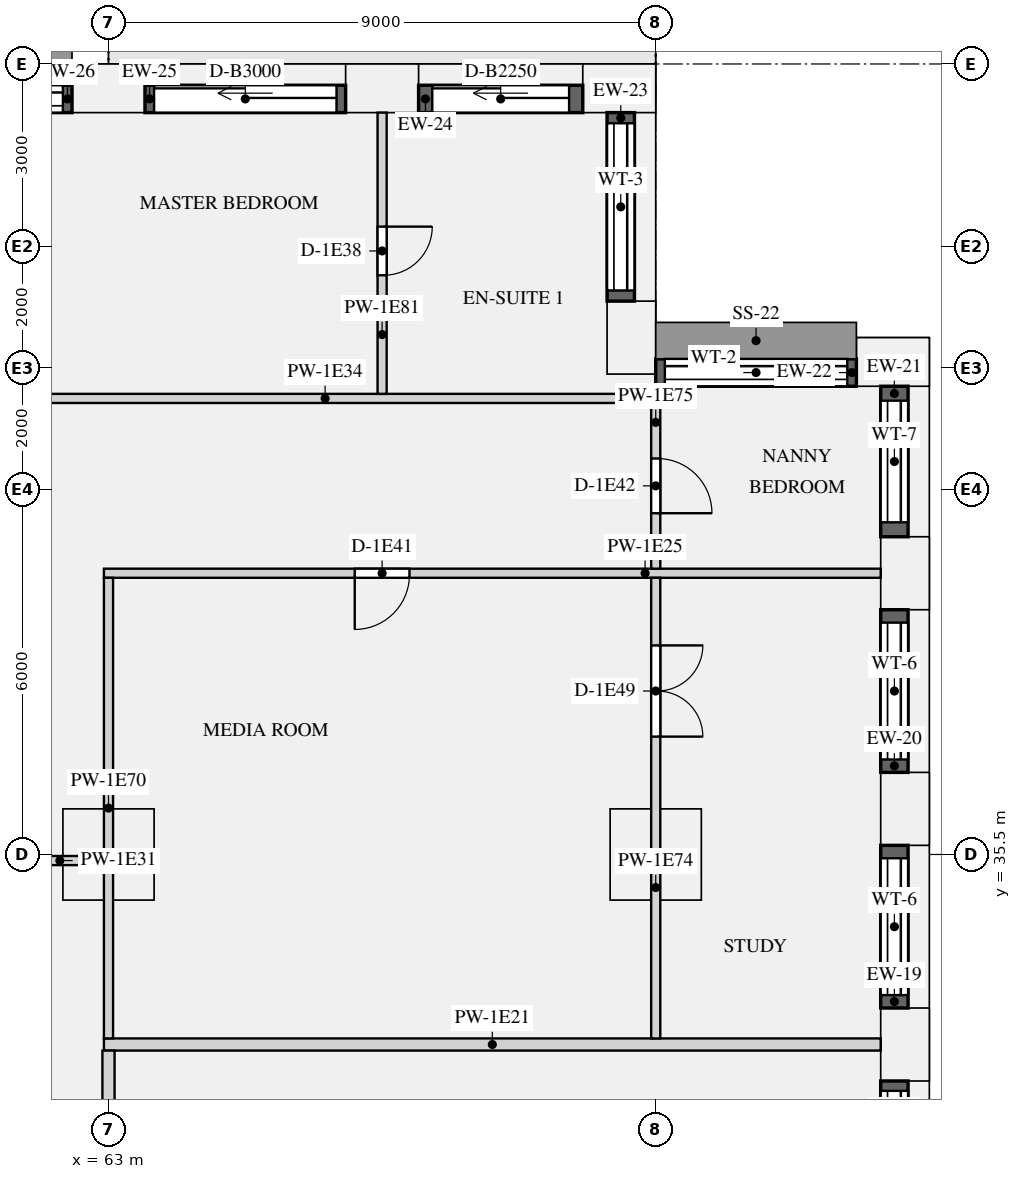
"""IFC4 building model, lengths in metres.
Left out: names, types, materials, properties, quantities, classifications, styles, units other than length and angle.
Written with IfcOpenShell. Run it as: python <this file> out.ifc"""

import sys

from ifc_helpers import new_model, si_unit, direction, frame, frame_2d, origin, origin_2d, place, context, subcontext, project, spatial, rectangle, extrude, element, fill, save


model = new_model("IFC4")
c1 = context("Model", 3, precision=1e-05, world=origin(), true_north=direction((0.0, 1.0)))
c2 = subcontext(c1, "Body", "Model", "MODEL_VIEW")
j1 = project(units=[si_unit("LENGTHUNIT", "METRE"), si_unit("PLANEANGLEUNIT", "RADIAN")], contexts=[c1])
p1 = place(None, origin())
s1 = spatial("IfcSite", under=j1, at=p1, CompositionType="ELEMENT")
p2 = place(p1, origin())
s2 = spatial("IfcBuilding", under=s1, at=p2, CompositionType="ELEMENT")
p3 = place(p2, frame((0.0, 0.0, 54.15)))
s3 = spatial("IfcBuildingStorey", under=s2, at=p3, CompositionType="ELEMENT", Elevation=54.15)
for number, where, z_axis, x_axis in (
    (1, (76.1, 32.375, 0.0), (0.0, 0.0, 1.0), (0.0, 1.0, 0.0)),
    (2, (76.1, 36.25, 0.0), (0.0, 0.0, 1.0), (0.0, 1.0, 0.0)),
    (3, (76.1, 40.125, 0.0), (0.0, 0.0, 1.0), (0.0, 1.0, 0.0)),
    (4, (75.9, 43.6, 0.0), (0.0, 0.0, 1.0), (-1.0, 0.0, 0.0)),
    (5, (71.6, 44.0, 0.0), (0.0, 0.0, 1.0), (0.0, 1.0, 0.0)),
    (6, (71.4, 48.1, 0.0), (0.0, 0.0, 1.0), (-1.0, 0.0, 0.0)),
    (7, (67.5, 48.1, 0.0), (0.0, 0.0, 1.0), (-1.0, 0.0, 0.0)),
    (8, (63.0, 48.1, 0.0), (0.0, 0.0, 1.0), (-1.0, 0.0, 0.0)),
):
    element("IfcColumn", number, at=place(p3, frame(where, z_axis=z_axis, x_axis=x_axis)), inside=s3, PredefinedType="USERDEFINED", context=c2, shape_type="SweptSolid", body=[
        extrude(rectangle(XDim=1.2, YDim=0.8, at=origin_2d()), origin(), (0.0, 0.0, 1.0), 3.15),
    ])
for number, where, z_axis, x_axis in (
    (9, (63.0, 35.5, 0.0), (0.0, 0.0, 1.0), (1.0, 0.0, 0.0)),
    (10, (72.0, 35.5, 0.0), (0.0, 0.0, 1.0), (1.0, 0.0, 0.0)),
):
    element("IfcColumn", number, at=place(p3, frame(where, z_axis=z_axis, x_axis=x_axis)), inside=s3, PredefinedType="COLUMN", context=c2, shape_type="SweptSolid", body=[
        extrude(rectangle(XDim=1.5, YDim=1.5, at=origin_2d()), origin(), (0.0, 0.0, 1.0), 3.15),
    ])
p4 = place(p3, frame((75.925, 29.7, 0.9), z_axis=(0.0, 0.0, 1.0), x_axis=(0.0, 1.0, 0.0)))
e11 = element("IfcWall", 11, at=p4, inside=s3, PredefinedType="SOLIDWALL", context=c2, shape_type="SweptSolid", body=[
    extrude(rectangle(XDim=2.075, YDim=0.45, at=frame_2d((1.038, 0.0))), origin(), (0.0, 0.0, 1.0), 1.93),
])
p5 = place(p4, frame((0.163, 0.0, 0.15)))
e12 = element("IfcOpeningElement", 12, at=p5, cuts=e11, PredefinedType="OPENING", context=c2, shape_type="SweptSolid", body=[
    extrude(rectangle(XDim=1.75, YDim=1.5, at=frame_2d((0.875, 0.75))), frame((0.0, 0.235, 0.0), z_axis=(0.0, -1.0, 0.0), x_axis=(1.0, 0.0, 0.0)), (0.0, 0.0, 1.0), 0.47),
])
p6 = place(p3, frame((75.925, 32.975, 0.9), z_axis=(0.0, 0.0, 1.0), x_axis=(0.0, 1.0, 0.0)))
e13 = element("IfcWall", 13, at=p6, inside=s3, PredefinedType="SOLIDWALL", context=c2, shape_type="SweptSolid", body=[
    extrude(rectangle(XDim=2.675, YDim=0.45, at=frame_2d((1.337, 0.0))), origin(), (0.0, 0.0, 1.0), 1.93),
])
p7 = place(p6, frame((0.212, 0.0, 0.15)))
e14 = element("IfcOpeningElement", 14, at=p7, cuts=e13, PredefinedType="OPENING", context=c2, shape_type="SweptSolid", body=[
    extrude(rectangle(XDim=2.25, YDim=1.5, at=frame_2d((1.125, 0.75))), frame((0.0, 0.235, 0.0), z_axis=(0.0, -1.0, 0.0), x_axis=(1.0, 0.0, 0.0)), (0.0, 0.0, 1.0), 0.47),
])
p8 = place(p3, frame((75.925, 36.85, 0.9), z_axis=(0.0, 0.0, 1.0), x_axis=(0.0, 1.0, 0.0)))
e15 = element("IfcWall", 15, at=p8, inside=s3, PredefinedType="SOLIDWALL", context=c2, shape_type="SweptSolid", body=[
    extrude(rectangle(XDim=2.675, YDim=0.45, at=frame_2d((1.337, 0.0))), origin(), (0.0, 0.0, 1.0), 1.93),
])
p9 = place(p8, frame((0.212, 0.0, 0.15)))
e16 = element("IfcOpeningElement", 16, at=p9, cuts=e15, PredefinedType="OPENING", context=c2, shape_type="SweptSolid", body=[
    extrude(rectangle(XDim=2.25, YDim=1.5, at=frame_2d((1.125, 0.75))), frame((0.0, 0.235, 0.0), z_axis=(0.0, -1.0, 0.0), x_axis=(1.0, 0.0, 0.0)), (0.0, 0.0, 1.0), 0.47),
])
p10 = place(p3, frame((75.925, 40.725, 0.9), z_axis=(0.0, 0.0, 1.0), x_axis=(0.0, 1.0, 0.0)))
e17 = element("IfcWall", 17, at=p10, inside=s3, PredefinedType="SOLIDWALL", context=c2, shape_type="SweptSolid", body=[
    extrude(rectangle(XDim=2.475, YDim=0.45, at=frame_2d((1.237, 0.0))), origin(), (0.0, 0.0, 1.0), 1.93),
])
p11 = place(p10, frame((0.238, 0.0, 0.15)))
e18 = element("IfcOpeningElement", 18, at=p11, cuts=e17, PredefinedType="OPENING", context=c2, shape_type="SweptSolid", body=[
    extrude(rectangle(XDim=2.0, YDim=1.5, at=frame_2d((1.0, 0.75))), frame((0.0, 0.235, 0.0), z_axis=(0.0, -1.0, 0.0), x_axis=(1.0, 0.0, 0.0)), (0.0, 0.0, 1.0), 0.47),
])
p12 = place(p3, frame((75.3, 43.425, 0.9), z_axis=(0.0, 0.0, 1.0), x_axis=(-1.0, 0.0, 0.0)))
e19 = element("IfcWall", 19, at=p12, inside=s3, PredefinedType="SOLIDWALL", context=c2, shape_type="SweptSolid", body=[
    extrude(rectangle(XDim=3.3, YDim=0.45, at=frame_2d((1.65, 0.0))), origin(), (0.0, 0.0, 1.0), 1.93),
])
p13 = place(p12, frame((0.15, 0.0, 0.15)))
e20 = element("IfcOpeningElement", 20, at=p13, cuts=e19, PredefinedType="OPENING", context=c2, shape_type="SweptSolid", body=[
    extrude(rectangle(XDim=3.0, YDim=1.5, at=frame_2d((1.5, 0.75))), frame((0.0, 0.235, 0.0), z_axis=(0.0, -1.0, 0.0), x_axis=(1.0, 0.0, 0.0)), (0.0, 0.0, 1.0), 0.47),
])
p14 = place(p3, frame((71.425, 44.6, 0.9), z_axis=(0.0, 0.0, 1.0), x_axis=(0.0, 1.0, 0.0)))
e21 = element("IfcWall", 21, at=p14, inside=s3, PredefinedType="SOLIDWALL", context=c2, shape_type="SweptSolid", body=[
    extrude(rectangle(XDim=3.1, YDim=0.45, at=frame_2d((1.55, 0.0))), origin(), (0.0, 0.0, 1.0), 1.93),
])
p15 = place(p14, frame((0.175, 0.0, 0.15)))
e22 = element("IfcOpeningElement", 22, at=p15, cuts=e21, PredefinedType="OPENING", context=c2, shape_type="SweptSolid", body=[
    extrude(rectangle(XDim=2.75, YDim=1.5, at=frame_2d((1.375, 0.75))), frame((0.0, 0.235, 0.0), z_axis=(0.0, -1.0, 0.0), x_axis=(1.0, 0.0, 0.0)), (0.0, 0.0, 1.0), 0.47),
])
p16 = place(p3, frame((70.8, 47.925, 0.0), z_axis=(0.0, 0.0, 1.0), x_axis=(-1.0, 0.0, 0.0)))
e23 = element("IfcWall", 23, at=p16, inside=s3, PredefinedType="SOLIDWALL", context=c2, shape_type="SweptSolid", body=[
    extrude(rectangle(XDim=2.7, YDim=0.45, at=frame_2d((1.35, 0.0))), origin(), (0.0, 0.0, 1.0), 2.83),
])
p17 = place(p16, frame((0.225, 0.0, 0.0)))
e24 = element("IfcOpeningElement", 24, at=p17, cuts=e23, PredefinedType="OPENING", context=c2, shape_type="SweptSolid", body=[
    extrude(rectangle(XDim=2.25, YDim=2.3, at=frame_2d((1.125, 1.15))), frame((0.0, 0.235, 0.0), z_axis=(0.0, -1.0, 0.0), x_axis=(1.0, 0.0, 0.0)), (0.0, 0.0, 1.0), 0.47),
])
p18 = place(p3, frame((66.9, 47.925, 0.0), z_axis=(0.0, 0.0, 1.0), x_axis=(-1.0, 0.0, 0.0)))
e25 = element("IfcWall", 25, at=p18, inside=s3, PredefinedType="SOLIDWALL", context=c2, shape_type="SweptSolid", body=[
    extrude(rectangle(XDim=3.3, YDim=0.45, at=frame_2d((1.65, 0.0))), origin(), (0.0, 0.0, 1.0), 2.83),
])
p19 = place(p18, frame((0.15, 0.0, 0.0)))
e26 = element("IfcOpeningElement", 26, at=p19, cuts=e25, PredefinedType="OPENING", context=c2, shape_type="SweptSolid", body=[
    extrude(rectangle(XDim=3.0, YDim=2.3, at=frame_2d((1.5, 1.15))), frame((0.0, 0.235, 0.0), z_axis=(0.0, -1.0, 0.0), x_axis=(1.0, 0.0, 0.0)), (0.0, 0.0, 1.0), 0.47),
])
p20 = place(p3, frame((62.4, 47.925, 0.9), z_axis=(0.0, 0.0, 1.0), x_axis=(-1.0, 0.0, 0.0)))
e27 = element("IfcWall", 27, at=p20, inside=s3, PredefinedType="SOLIDWALL", context=c2, shape_type="SweptSolid", body=[
    extrude(rectangle(XDim=3.3, YDim=0.45, at=frame_2d((1.65, 0.0))), origin(), (0.0, 0.0, 1.0), 1.93),
])
p21 = place(p20, frame((0.15, 0.0, 0.15)))
e28 = element("IfcOpeningElement", 28, at=p21, cuts=e27, PredefinedType="OPENING", context=c2, shape_type="SweptSolid", body=[
    extrude(rectangle(XDim=3.0, YDim=1.5, at=frame_2d((1.5, 0.75))), frame((0.0, 0.235, 0.0), z_axis=(0.0, -1.0, 0.0), x_axis=(1.0, 0.0, 0.0)), (0.0, 0.0, 1.0), 0.47),
])
p22 = place(p3, frame((62.925, 32.375, 0.0), z_axis=(0.0, 0.0, 1.0), x_axis=(1.0, 0.0, 0.0)))
e29 = element("IfcWall", 29, at=p22, inside=s3, PredefinedType="PARTITIONING", context=c2, shape_type="SweptSolid", body=[
    extrude(rectangle(XDim=12.775, YDim=0.2, at=frame_2d((6.387, 0.0))), origin(), (0.0, 0.0, 1.0), 2.83),
])
p23 = place(p3, frame((62.925, 40.125, 0.0), z_axis=(0.0, 0.0, 1.0), x_axis=(1.0, 0.0, 0.0)))
e30 = element("IfcWall", 30, at=p23, inside=s3, PredefinedType="PARTITIONING", context=c2, shape_type="SweptSolid", body=[
    extrude(rectangle(XDim=12.775, YDim=0.15, at=frame_2d((6.387, 0.0))), origin(), (0.0, 0.0, 1.0), 2.83),
])
p24 = place(p23, frame((4.125, 0.0, 0.0)))
e31 = element("IfcOpeningElement", 31, at=p24, cuts=e30, PredefinedType="OPENING", context=c2, shape_type="SweptSolid", body=[
    extrude(rectangle(XDim=0.9, YDim=2.1, at=frame_2d((0.45, 1.05))), frame((0.0, 0.085, 0.0), z_axis=(0.0, -1.0, 0.0), x_axis=(1.0, 0.0, 0.0)), (0.0, 0.0, 1.0), 0.17),
])
p25 = place(p3, frame((59.8, 35.4, 0.0), z_axis=(0.0, 0.0, 1.0), x_axis=(1.0, 0.0, 0.0)))
e32 = element("IfcWall", 32, at=p25, inside=s3, PredefinedType="PARTITIONING", context=c2, shape_type="SweptSolid", body=[
    extrude(rectangle(XDim=3.125, YDim=0.15, at=frame_2d((1.562, 0.0))), origin(), (0.0, 0.0, 1.0), 2.83),
])
p26 = place(p25, frame((0.775, 0.0, 0.0)))
e33 = element("IfcOpeningElement", 33, at=p26, cuts=e32, PredefinedType="OPENING", context=c2, shape_type="SweptSolid", body=[
    extrude(rectangle(XDim=0.9, YDim=2.1, at=frame_2d((0.45, 1.05))), frame((0.0, 0.085, 0.0), z_axis=(0.0, -1.0, 0.0), x_axis=(1.0, 0.0, 0.0)), (0.0, 0.0, 1.0), 0.17),
])
p27 = place(p3, frame((54.075, 43.0, 0.0), z_axis=(0.0, 0.0, 1.0), x_axis=(1.0, 0.0, 0.0)))
e34 = element("IfcWall", 34, at=p27, inside=s3, PredefinedType="PARTITIONING", context=c2, shape_type="SweptSolid", body=[
    extrude(rectangle(XDim=17.85, YDim=0.15, at=frame_2d((8.925, 0.0))), origin(), (0.0, 0.0, 1.0), 2.83),
])
p28 = place(p27, frame((6.225, 0.0, 0.0)))
e35 = element("IfcOpeningElement", 35, at=p28, cuts=e34, PredefinedType="OPENING", context=c2, shape_type="SweptSolid", body=[
    extrude(rectangle(XDim=0.9, YDim=2.1, at=frame_2d((0.45, 1.05))), frame((0.0, 0.085, 0.0), z_axis=(0.0, -1.0, 0.0), x_axis=(1.0, 0.0, 0.0)), (0.0, 0.0, 1.0), 0.17),
])
p29 = place(p27, frame((1.725, 0.0, 0.0)))
e36 = element("IfcOpeningElement", 36, at=p29, cuts=e34, PredefinedType="OPENING", context=c2, shape_type="SweptSolid", body=[
    extrude(rectangle(XDim=0.9, YDim=2.1, at=frame_2d((0.45, 1.05))), frame((0.0, 0.085, 0.0), z_axis=(0.0, -1.0, 0.0), x_axis=(1.0, 0.0, 0.0)), (0.0, 0.0, 1.0), 0.17),
])
p30 = place(p3, frame((63.0, 32.475, 0.0), z_axis=(0.0, 0.0, 1.0), x_axis=(0.0, 1.0, 0.0)))
e37 = element("IfcWall", 37, at=p30, inside=s3, PredefinedType="PARTITIONING", context=c2, shape_type="SweptSolid", body=[
    extrude(rectangle(XDim=7.575, YDim=0.15, at=frame_2d((3.788, 0.0))), origin(), (0.0, 0.0, 1.0), 2.83),
])
p31 = place(p3, frame((63.0, 28.575, 0.0), z_axis=(0.0, 0.0, 1.0), x_axis=(0.0, 1.0, 0.0)))
e38 = element("IfcWall", 38, at=p31, inside=s3, PredefinedType="PARTITIONING", context=c2, shape_type="SweptSolid", body=[
    extrude(rectangle(XDim=3.7, YDim=0.2, at=frame_2d((1.85, 0.0))), origin(), (0.0, 0.0, 1.0), 2.83),
])
p32 = place(p3, frame((72.0, 32.475, 0.0), z_axis=(0.0, 0.0, 1.0), x_axis=(0.0, 1.0, 0.0)))
e39 = element("IfcWall", 39, at=p32, inside=s3, PredefinedType="PARTITIONING", context=c2, shape_type="SweptSolid", body=[
    extrude(rectangle(XDim=7.575, YDim=0.15, at=frame_2d((3.788, 0.0))), origin(), (0.0, 0.0, 1.0), 2.83),
])
p33 = place(p32, frame((4.963, 0.0, 0.0)))
e40 = element("IfcOpeningElement", 40, at=p33, cuts=e39, PredefinedType="OPENING", context=c2, shape_type="SweptSolid", body=[
    extrude(rectangle(XDim=1.5, YDim=2.1, at=frame_2d((0.75, 1.05))), frame((0.0, 0.085, 0.0), z_axis=(0.0, -1.0, 0.0), x_axis=(1.0, 0.0, 0.0)), (0.0, 0.0, 1.0), 0.17),
])
p34 = place(p3, frame((72.0, 40.2, 0.0), z_axis=(0.0, 0.0, 1.0), x_axis=(0.0, 1.0, 0.0)))
e41 = element("IfcWall", 41, at=p34, inside=s3, PredefinedType="PARTITIONING", context=c2, shape_type="SweptSolid", body=[
    extrude(rectangle(XDim=3.0, YDim=0.15, at=frame_2d((1.5, 0.0))), origin(), (0.0, 0.0, 1.0), 2.83),
])
p35 = place(p34, frame((0.912, 0.0, 0.0)))
e42 = element("IfcOpeningElement", 42, at=p35, cuts=e41, PredefinedType="OPENING", context=c2, shape_type="SweptSolid", body=[
    extrude(rectangle(XDim=0.9, YDim=2.1, at=frame_2d((0.45, 1.05))), frame((0.0, 0.085, 0.0), z_axis=(0.0, -1.0, 0.0), x_axis=(1.0, 0.0, 0.0)), (0.0, 0.0, 1.0), 0.17),
])
p36 = place(p3, frame((67.5, 43.075, 0.0), z_axis=(0.0, 0.0, 1.0), x_axis=(0.0, 1.0, 0.0)))
e43 = element("IfcWall", 43, at=p36, inside=s3, PredefinedType="PARTITIONING", context=c2, shape_type="SweptSolid", body=[
    extrude(rectangle(XDim=4.625, YDim=0.15, at=frame_2d((2.312, 0.0))), origin(), (0.0, 0.0, 1.0), 2.83),
])
p37 = place(p36, frame((1.95, 0.0, 0.0)))
e44 = element("IfcOpeningElement", 44, at=p37, cuts=e43, PredefinedType="OPENING", context=c2, shape_type="SweptSolid", body=[
    extrude(rectangle(XDim=0.8, YDim=2.1, at=frame_2d((0.4, 1.05))), frame((0.0, 0.085, 0.0), z_axis=(0.0, -1.0, 0.0), x_axis=(1.0, 0.0, 0.0)), (0.0, 0.0, 1.0), 0.17),
])
p38 = place(p5, origin())
e45 = element("IfcWindow", 45, at=p38, inside=s3, PartitioningType="SINGLE_PANEL", PredefinedType="WINDOW", context=c2, shape_type="SweptSolid", body=[
    extrude(rectangle(XDim=1.75, YDim=1.5, at=frame_2d((0.875, 0.75))), frame((0.0, -0.065, 0.0), z_axis=(0.0, -1.0, 0.0), x_axis=(1.0, 0.0, 0.0)), (0.0, 0.0, 1.0), 0.06),
])
fill(e12, e45)
p39 = place(p7, origin())
e46 = element("IfcWindow", 46, at=p39, inside=s3, PartitioningType="SINGLE_PANEL", PredefinedType="WINDOW", context=c2, shape_type="SweptSolid", body=[
    extrude(rectangle(XDim=2.25, YDim=1.5, at=frame_2d((1.125, 0.75))), frame((0.0, -0.065, 0.0), z_axis=(0.0, -1.0, 0.0), x_axis=(1.0, 0.0, 0.0)), (0.0, 0.0, 1.0), 0.06),
])
fill(e14, e46)
p40 = place(p9, origin())
e47 = element("IfcWindow", 47, at=p40, inside=s3, PartitioningType="SINGLE_PANEL", PredefinedType="WINDOW", context=c2, shape_type="SweptSolid", body=[
    extrude(rectangle(XDim=2.25, YDim=1.5, at=frame_2d((1.125, 0.75))), frame((0.0, -0.065, 0.0), z_axis=(0.0, -1.0, 0.0), x_axis=(1.0, 0.0, 0.0)), (0.0, 0.0, 1.0), 0.06),
])
fill(e16, e47)
p41 = place(p11, origin())
e48 = element("IfcWindow", 48, at=p41, inside=s3, PartitioningType="SINGLE_PANEL", PredefinedType="WINDOW", context=c2, shape_type="SweptSolid", body=[
    extrude(rectangle(XDim=2.0, YDim=1.5, at=frame_2d((1.0, 0.75))), frame((0.0, -0.065, 0.0), z_axis=(0.0, -1.0, 0.0), x_axis=(1.0, 0.0, 0.0)), (0.0, 0.0, 1.0), 0.06),
])
fill(e18, e48)
p42 = place(p13, origin())
e49 = element("IfcWindow", 49, at=p42, inside=s3, PartitioningType="SINGLE_PANEL", PredefinedType="WINDOW", context=c2, shape_type="SweptSolid", body=[
    extrude(rectangle(XDim=3.0, YDim=1.5, at=frame_2d((1.5, 0.75))), frame((0.0, -0.065, 0.0), z_axis=(0.0, -1.0, 0.0), x_axis=(1.0, 0.0, 0.0)), (0.0, 0.0, 1.0), 0.06),
])
fill(e20, e49)
p43 = place(p15, origin())
e50 = element("IfcWindow", 50, at=p43, inside=s3, PartitioningType="SINGLE_PANEL", PredefinedType="WINDOW", context=c2, shape_type="SweptSolid", body=[
    extrude(rectangle(XDim=2.75, YDim=1.5, at=frame_2d((1.375, 0.75))), frame((0.0, -0.065, 0.0), z_axis=(0.0, -1.0, 0.0), x_axis=(1.0, 0.0, 0.0)), (0.0, 0.0, 1.0), 0.06),
])
fill(e22, e50)
p44 = place(p17, origin())
e51 = element("IfcDoor", 51, at=p44, inside=s3, OperationType="SLIDING_TO_LEFT", PredefinedType="DOOR", context=c2, shape_type="SweptSolid", body=[
    extrude(rectangle(XDim=2.25, YDim=2.3, at=frame_2d((1.125, 1.15))), frame((0.0, -0.07, 0.0), z_axis=(0.0, -1.0, 0.0), x_axis=(1.0, 0.0, 0.0)), (0.0, 0.0, 1.0), 0.05),
])
fill(e24, e51)
p45 = place(p19, origin())
e52 = element("IfcDoor", 52, at=p45, inside=s3, OperationType="SLIDING_TO_LEFT", PredefinedType="DOOR", context=c2, shape_type="SweptSolid", body=[
    extrude(rectangle(XDim=3.0, YDim=2.3, at=frame_2d((1.5, 1.15))), frame((0.0, -0.07, 0.0), z_axis=(0.0, -1.0, 0.0), x_axis=(1.0, 0.0, 0.0)), (0.0, 0.0, 1.0), 0.05),
])
fill(e26, e52)
p46 = place(p21, origin())
e53 = element("IfcWindow", 53, at=p46, inside=s3, PartitioningType="SINGLE_PANEL", PredefinedType="WINDOW", context=c2, shape_type="SweptSolid", body=[
    extrude(rectangle(XDim=3.0, YDim=1.5, at=frame_2d((1.5, 0.75))), frame((0.0, -0.065, 0.0), z_axis=(0.0, -1.0, 0.0), x_axis=(1.0, 0.0, 0.0)), (0.0, 0.0, 1.0), 0.06),
])
fill(e28, e53)
p47 = place(p37, frame((0.8, 0.0, 0.0), z_axis=(0.0, 0.0, 1.0), x_axis=(-1.0, 0.0, 0.0)))
e54 = element("IfcDoor", 54, at=p47, inside=s3, OperationType="SINGLE_SWING_LEFT", PredefinedType="DOOR", context=c2, shape_type="SweptSolid", body=[
    extrude(rectangle(XDim=0.8, YDim=2.1, at=frame_2d((0.4, 1.05))), frame((0.0, 0.025, 0.0), z_axis=(0.0, -1.0, 0.0), x_axis=(1.0, 0.0, 0.0)), (0.0, 0.0, 1.0), 0.05),
])
fill(e44, e54)
p48 = place(p24, frame((0.9, 0.0, 0.0), z_axis=(0.0, 0.0, 1.0), x_axis=(-1.0, 0.0, 0.0)))
e55 = element("IfcDoor", 55, at=p48, inside=s3, OperationType="SINGLE_SWING_RIGHT", PredefinedType="DOOR", context=c2, shape_type="SweptSolid", body=[
    extrude(rectangle(XDim=0.9, YDim=2.1, at=frame_2d((0.45, 1.05))), frame((0.0, 0.025, 0.0), z_axis=(0.0, -1.0, 0.0), x_axis=(1.0, 0.0, 0.0)), (0.0, 0.0, 1.0), 0.05),
])
fill(e31, e55)
p49 = place(p35, frame((0.9, 0.0, 0.0), z_axis=(0.0, 0.0, 1.0), x_axis=(-1.0, 0.0, 0.0)))
e56 = element("IfcDoor", 56, at=p49, inside=s3, OperationType="SINGLE_SWING_RIGHT", PredefinedType="DOOR", context=c2, shape_type="SweptSolid", body=[
    extrude(rectangle(XDim=0.9, YDim=2.1, at=frame_2d((0.45, 1.05))), frame((0.0, 0.025, 0.0), z_axis=(0.0, -1.0, 0.0), x_axis=(1.0, 0.0, 0.0)), (0.0, 0.0, 1.0), 0.05),
])
fill(e42, e56)
p50 = place(p33, frame((1.5, 0.0, 0.0), z_axis=(0.0, 0.0, 1.0), x_axis=(-1.0, 0.0, 0.0)))
e57 = element("IfcDoor", 57, at=p50, inside=s3, OperationType="DOUBLE_DOOR_SINGLE_SWING", PredefinedType="DOOR", context=c2, shape_type="SweptSolid", body=[
    extrude(rectangle(XDim=1.5, YDim=2.1, at=frame_2d((0.75, 1.05))), frame((0.0, 0.025, 0.0), z_axis=(0.0, -1.0, 0.0), x_axis=(1.0, 0.0, 0.0)), (0.0, 0.0, 1.0), 0.05),
])
fill(e40, e57)
save(model, sys.argv[1])
